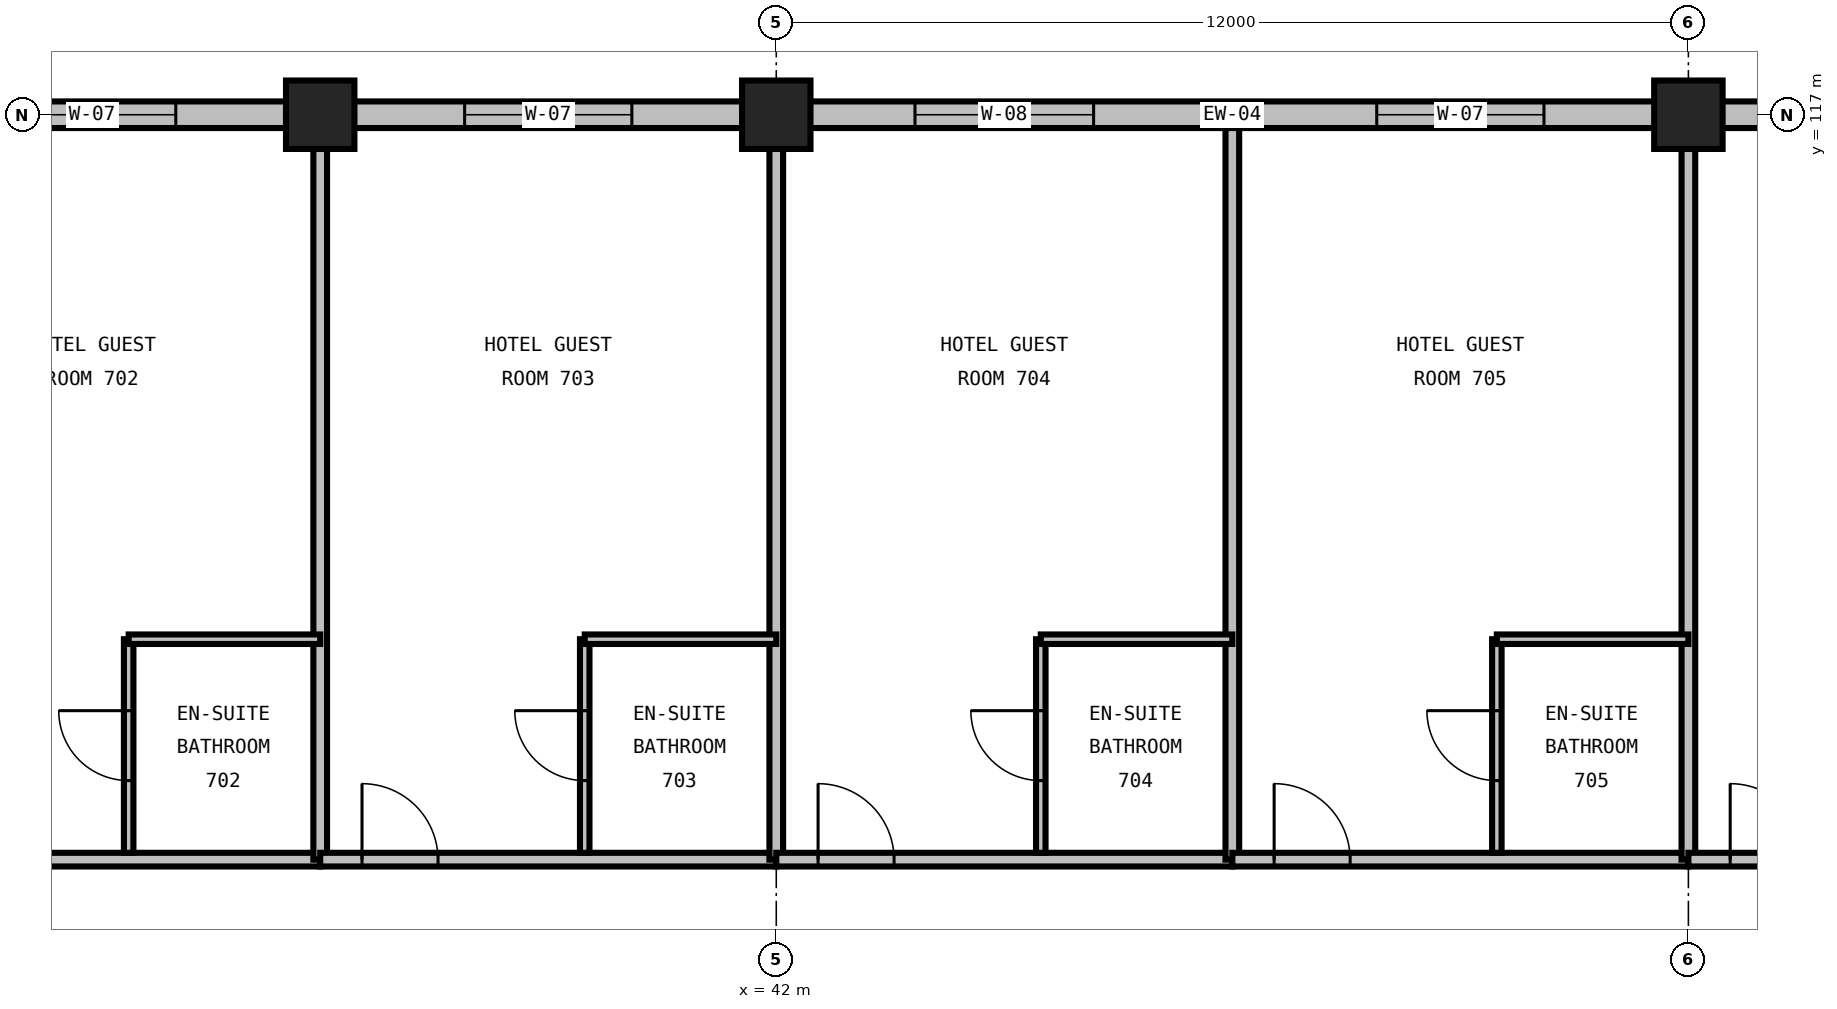
"""IFC4 building model, lengths in metres.
Left out: names, types, materials, properties, quantities, classifications, styles, units other than length and angle.
Written with IfcOpenShell. Run it as: python <this file> out.ifc"""

import sys

from ifc_helpers import new_model, si_unit, direction, frame, frame_2d, origin, origin_2d, place, context, subcontext, project, spatial, rectangle, extrude, element, fill, save


model = new_model("IFC4")
c1 = context("Model", 3, precision=1e-05, world=origin(), true_north=direction((0.0, 1.0)))
c2 = subcontext(c1, "Body", "Model", "MODEL_VIEW")
j1 = project(units=[si_unit("LENGTHUNIT", "METRE"), si_unit("PLANEANGLEUNIT", "RADIAN")], contexts=[c1])
p1 = place(None, origin())
s1 = spatial("IfcSite", under=j1, at=p1, CompositionType="ELEMENT")
p2 = place(p1, origin())
s2 = spatial("IfcBuilding", under=s1, at=p2, CompositionType="ELEMENT")
p3 = place(p2, frame((0.0, 0.0, 34.8)))
s3 = spatial("IfcBuildingStorey", under=s2, at=p3, CompositionType="ELEMENT", Elevation=34.8)
for number, where, z_axis, x_axis in (
    (1, (36.0, 117.0, 0.0), (0.0, 0.0, 1.0), (1.0, 0.0, 0.0)),
    (2, (42.0, 117.0, 0.0), (0.0, 0.0, 1.0), (1.0, 0.0, 0.0)),
    (3, (54.0, 117.0, 0.0), (0.0, 0.0, 1.0), (1.0, 0.0, 0.0)),
):
    element("IfcColumn", number, at=place(p3, frame(where, z_axis=z_axis, x_axis=x_axis)), inside=s3, PredefinedType="COLUMN", context=c2, shape_type="SweptSolid", body=[
        extrude(rectangle(XDim=0.9, YDim=0.9, at=origin_2d()), origin(), (0.0, 0.0, 1.0), 3.6),
    ])
p4 = place(p3, frame((36.0, 117.0, 0.0), z_axis=(0.0, 0.0, 1.0), x_axis=(-1.0, 0.0, 0.0)))
e4 = element("IfcWall", 4, at=p4, inside=s3, PredefinedType="STANDARD", context=c2, shape_type="SweptSolid", body=[
    extrude(rectangle(XDim=6.0, YDim=0.35, at=frame_2d((3.0, 0.0))), origin(), (0.0, 0.0, 1.0), 2.486),
])
p5 = place(p4, frame((1.9, 0.0, 0.75)))
e5 = element("IfcOpeningElement", 5, at=p5, cuts=e4, PredefinedType="OPENING", context=c2, shape_type="SweptSolid", body=[
    extrude(rectangle(XDim=2.2, YDim=1.6, at=frame_2d((1.1, 0.8))), frame((0.0, 0.19, 0.0), z_axis=(0.0, -1.0, 0.0), x_axis=(1.0, 0.0, 0.0)), (0.0, 0.0, 1.0), 0.38),
])
p6 = place(p3, frame((42.0, 117.0, 0.0), z_axis=(0.0, 0.0, 1.0), x_axis=(-1.0, 0.0, 0.0)))
e6 = element("IfcWall", 6, at=p6, inside=s3, PredefinedType="STANDARD", context=c2, shape_type="SweptSolid", body=[
    extrude(rectangle(XDim=6.0, YDim=0.35, at=frame_2d((3.0, 0.0))), origin(), (0.0, 0.0, 1.0), 2.486),
])
p7 = place(p6, frame((1.9, 0.0, 0.75)))
e7 = element("IfcOpeningElement", 7, at=p7, cuts=e6, PredefinedType="OPENING", context=c2, shape_type="SweptSolid", body=[
    extrude(rectangle(XDim=2.2, YDim=1.6, at=frame_2d((1.1, 0.8))), frame((0.0, 0.19, 0.0), z_axis=(0.0, -1.0, 0.0), x_axis=(1.0, 0.0, 0.0)), (0.0, 0.0, 1.0), 0.38),
])
p8 = place(p3, frame((54.0, 117.0, 0.0), z_axis=(0.0, 0.0, 1.0), x_axis=(-1.0, 0.0, 0.0)))
e8 = element("IfcWall", 8, at=p8, inside=s3, PredefinedType="STANDARD", context=c2, shape_type="SweptSolid", body=[
    extrude(rectangle(XDim=12.0, YDim=0.35, at=frame_2d((6.0, 0.0))), origin(), (0.0, 0.0, 1.0), 2.486),
])
p9 = place(p8, frame((1.9, 0.0, 0.75)))
e9 = element("IfcOpeningElement", 9, at=p9, cuts=e8, PredefinedType="OPENING", context=c2, shape_type="SweptSolid", body=[
    extrude(rectangle(XDim=2.2, YDim=1.6, at=frame_2d((1.1, 0.8))), frame((0.0, 0.19, 0.0), z_axis=(0.0, -1.0, 0.0), x_axis=(1.0, 0.0, 0.0)), (0.0, 0.0, 1.0), 0.38),
])
p10 = place(p8, frame((7.825, 0.0, 0.75)))
e10 = element("IfcOpeningElement", 10, at=p10, cuts=e8, PredefinedType="OPENING", context=c2, shape_type="SweptSolid", body=[
    extrude(rectangle(XDim=2.35, YDim=1.6, at=frame_2d((1.175, 0.8))), frame((0.0, 0.19, 0.0), z_axis=(0.0, -1.0, 0.0), x_axis=(1.0, 0.0, 0.0)), (0.0, 0.0, 1.0), 0.38),
])
p11 = place(p3, frame((66.0, 117.0, 0.0), z_axis=(0.0, 0.0, 1.0), x_axis=(-1.0, 0.0, 0.0)))
e11 = element("IfcWall", 11, at=p11, inside=s3, PredefinedType="STANDARD", context=c2, shape_type="SweptSolid", body=[
    extrude(rectangle(XDim=12.0, YDim=0.35, at=frame_2d((6.0, 0.0))), origin(), (0.0, 0.0, 1.0), 2.486),
])
p12 = place(p11, frame((1.9, 0.0, 0.75)))
e12 = element("IfcOpeningElement", 12, at=p12, cuts=e11, PredefinedType="OPENING", context=c2, shape_type="SweptSolid", body=[
    extrude(rectangle(XDim=2.2, YDim=1.6, at=frame_2d((1.1, 0.8))), frame((0.0, 0.19, 0.0), z_axis=(0.0, -1.0, 0.0), x_axis=(1.0, 0.0, 0.0)), (0.0, 0.0, 1.0), 0.38),
])
p13 = place(p11, frame((7.825, 0.0, 0.75)))
e13 = element("IfcOpeningElement", 13, at=p13, cuts=e11, PredefinedType="OPENING", context=c2, shape_type="SweptSolid", body=[
    extrude(rectangle(XDim=2.35, YDim=1.6, at=frame_2d((1.175, 0.8))), frame((0.0, 0.19, 0.0), z_axis=(0.0, -1.0, 0.0), x_axis=(1.0, 0.0, 0.0)), (0.0, 0.0, 1.0), 0.38),
])
p14 = place(p3, frame((30.0, 107.2, 0.0), z_axis=(0.0, 0.0, 1.0), x_axis=(1.0, 0.0, 0.0)))
e14 = element("IfcWall", 14, at=p14, inside=s3, PredefinedType="PARTITIONING", context=c2, shape_type="SweptSolid", body=[
    extrude(rectangle(XDim=6.0, YDim=0.18, at=frame_2d((3.0, 0.0))), origin(), (0.0, 0.0, 1.0), 3.29),
])
p15 = place(p14, frame((0.55, 0.0, 0.0)))
e15 = element("IfcOpeningElement", 15, at=p15, cuts=e14, PredefinedType="OPENING", context=c2, shape_type="SweptSolid", body=[
    extrude(rectangle(XDim=1.0, YDim=2.15, at=frame_2d((0.5, 1.075))), frame((0.0, 0.105, 0.0), z_axis=(0.0, -1.0, 0.0), x_axis=(1.0, 0.0, 0.0)), (0.0, 0.0, 1.0), 0.21),
])
p16 = place(p3, frame((36.0, 107.2, 0.0), z_axis=(0.0, 0.0, 1.0), x_axis=(0.0, 1.0, 0.0)))
e16 = element("IfcWall", 16, at=p16, inside=s3, PredefinedType="PARTITIONING", context=c2, shape_type="SweptSolid", body=[
    extrude(rectangle(XDim=9.625, YDim=0.18, at=frame_2d((4.812, 0.0))), origin(), (0.0, 0.0, 1.0), 2.59),
])
p17 = place(p3, frame((33.48, 107.29, 0.0), z_axis=(0.0, 0.0, 1.0), x_axis=(0.0, 1.0, 0.0)))
e17 = element("IfcWall", 17, at=p17, inside=s3, PredefinedType="PARTITIONING", context=c2, shape_type="SweptSolid", body=[
    extrude(rectangle(XDim=2.81, YDim=0.125, at=frame_2d((1.405, 0.0))), origin(), (0.0, 0.0, 1.0), 3.29),
])
p18 = place(p17, frame((0.95, 0.0, 0.0)))
e18 = element("IfcOpeningElement", 18, at=p18, cuts=e17, PredefinedType="OPENING", context=c2, shape_type="SweptSolid", body=[
    extrude(rectangle(XDim=0.92, YDim=2.1, at=frame_2d((0.46, 1.05))), frame((0.0, 0.077, 0.0), z_axis=(0.0, -1.0, 0.0), x_axis=(1.0, 0.0, 0.0)), (0.0, 0.0, 1.0), 0.155),
])
p19 = place(p3, frame((33.48, 110.1, 0.0), z_axis=(0.0, 0.0, 1.0), x_axis=(1.0, 0.0, 0.0)))
e19 = element("IfcWall", 19, at=p19, inside=s3, PredefinedType="PARTITIONING", context=c2, shape_type="SweptSolid", body=[
    extrude(rectangle(XDim=2.52, YDim=0.125, at=frame_2d((1.26, 0.0))), origin(), (0.0, 0.0, 1.0), 3.29),
])
p20 = place(p3, frame((36.0, 107.2, 0.0), z_axis=(0.0, 0.0, 1.0), x_axis=(1.0, 0.0, 0.0)))
e20 = element("IfcWall", 20, at=p20, inside=s3, PredefinedType="PARTITIONING", context=c2, shape_type="SweptSolid", body=[
    extrude(rectangle(XDim=6.0, YDim=0.18, at=frame_2d((3.0, 0.0))), origin(), (0.0, 0.0, 1.0), 3.29),
])
p21 = place(p20, frame((0.55, 0.0, 0.0)))
e21 = element("IfcOpeningElement", 21, at=p21, cuts=e20, PredefinedType="OPENING", context=c2, shape_type="SweptSolid", body=[
    extrude(rectangle(XDim=1.0, YDim=2.15, at=frame_2d((0.5, 1.075))), frame((0.0, 0.105, 0.0), z_axis=(0.0, -1.0, 0.0), x_axis=(1.0, 0.0, 0.0)), (0.0, 0.0, 1.0), 0.21),
])
p22 = place(p3, frame((42.0, 107.2, 0.0), z_axis=(0.0, 0.0, 1.0), x_axis=(0.0, 1.0, 0.0)))
e22 = element("IfcWall", 22, at=p22, inside=s3, PredefinedType="PARTITIONING", context=c2, shape_type="SweptSolid", body=[
    extrude(rectangle(XDim=9.625, YDim=0.18, at=frame_2d((4.812, 0.0))), origin(), (0.0, 0.0, 1.0), 2.59),
])
p23 = place(p3, frame((39.48, 107.29, 0.0), z_axis=(0.0, 0.0, 1.0), x_axis=(0.0, 1.0, 0.0)))
e23 = element("IfcWall", 23, at=p23, inside=s3, PredefinedType="PARTITIONING", context=c2, shape_type="SweptSolid", body=[
    extrude(rectangle(XDim=2.81, YDim=0.125, at=frame_2d((1.405, 0.0))), origin(), (0.0, 0.0, 1.0), 3.29),
])
p24 = place(p23, frame((0.95, 0.0, 0.0)))
e24 = element("IfcOpeningElement", 24, at=p24, cuts=e23, PredefinedType="OPENING", context=c2, shape_type="SweptSolid", body=[
    extrude(rectangle(XDim=0.92, YDim=2.1, at=frame_2d((0.46, 1.05))), frame((0.0, 0.077, 0.0), z_axis=(0.0, -1.0, 0.0), x_axis=(1.0, 0.0, 0.0)), (0.0, 0.0, 1.0), 0.155),
])
p25 = place(p3, frame((39.48, 110.1, 0.0), z_axis=(0.0, 0.0, 1.0), x_axis=(1.0, 0.0, 0.0)))
e25 = element("IfcWall", 25, at=p25, inside=s3, PredefinedType="PARTITIONING", context=c2, shape_type="SweptSolid", body=[
    extrude(rectangle(XDim=2.52, YDim=0.125, at=frame_2d((1.26, 0.0))), origin(), (0.0, 0.0, 1.0), 3.29),
])
p26 = place(p3, frame((42.0, 107.2, 0.0), z_axis=(0.0, 0.0, 1.0), x_axis=(1.0, 0.0, 0.0)))
e26 = element("IfcWall", 26, at=p26, inside=s3, PredefinedType="PARTITIONING", context=c2, shape_type="SweptSolid", body=[
    extrude(rectangle(XDim=6.0, YDim=0.18, at=frame_2d((3.0, 0.0))), origin(), (0.0, 0.0, 1.0), 3.29),
])
p27 = place(p26, frame((0.55, 0.0, 0.0)))
e27 = element("IfcOpeningElement", 27, at=p27, cuts=e26, PredefinedType="OPENING", context=c2, shape_type="SweptSolid", body=[
    extrude(rectangle(XDim=1.0, YDim=2.15, at=frame_2d((0.5, 1.075))), frame((0.0, 0.105, 0.0), z_axis=(0.0, -1.0, 0.0), x_axis=(1.0, 0.0, 0.0)), (0.0, 0.0, 1.0), 0.21),
])
p28 = place(p3, frame((48.0, 107.2, 0.0), z_axis=(0.0, 0.0, 1.0), x_axis=(0.0, 1.0, 0.0)))
e28 = element("IfcWall", 28, at=p28, inside=s3, PredefinedType="PARTITIONING", context=c2, shape_type="SweptSolid", body=[
    extrude(rectangle(XDim=9.625, YDim=0.18, at=frame_2d((4.812, 0.0))), origin(), (0.0, 0.0, 1.0), 3.29),
])
p29 = place(p3, frame((45.48, 107.29, 0.0), z_axis=(0.0, 0.0, 1.0), x_axis=(0.0, 1.0, 0.0)))
e29 = element("IfcWall", 29, at=p29, inside=s3, PredefinedType="PARTITIONING", context=c2, shape_type="SweptSolid", body=[
    extrude(rectangle(XDim=2.81, YDim=0.125, at=frame_2d((1.405, 0.0))), origin(), (0.0, 0.0, 1.0), 3.29),
])
p30 = place(p29, frame((0.95, 0.0, 0.0)))
e30 = element("IfcOpeningElement", 30, at=p30, cuts=e29, PredefinedType="OPENING", context=c2, shape_type="SweptSolid", body=[
    extrude(rectangle(XDim=0.92, YDim=2.1, at=frame_2d((0.46, 1.05))), frame((0.0, 0.077, 0.0), z_axis=(0.0, -1.0, 0.0), x_axis=(1.0, 0.0, 0.0)), (0.0, 0.0, 1.0), 0.155),
])
p31 = place(p3, frame((45.48, 110.1, 0.0), z_axis=(0.0, 0.0, 1.0), x_axis=(1.0, 0.0, 0.0)))
e31 = element("IfcWall", 31, at=p31, inside=s3, PredefinedType="PARTITIONING", context=c2, shape_type="SweptSolid", body=[
    extrude(rectangle(XDim=2.52, YDim=0.125, at=frame_2d((1.26, 0.0))), origin(), (0.0, 0.0, 1.0), 3.29),
])
p32 = place(p3, frame((48.0, 107.2, 0.0), z_axis=(0.0, 0.0, 1.0), x_axis=(1.0, 0.0, 0.0)))
e32 = element("IfcWall", 32, at=p32, inside=s3, PredefinedType="PARTITIONING", context=c2, shape_type="SweptSolid", body=[
    extrude(rectangle(XDim=6.0, YDim=0.18, at=frame_2d((3.0, 0.0))), origin(), (0.0, 0.0, 1.0), 3.29),
])
p33 = place(p32, frame((0.55, 0.0, 0.0)))
e33 = element("IfcOpeningElement", 33, at=p33, cuts=e32, PredefinedType="OPENING", context=c2, shape_type="SweptSolid", body=[
    extrude(rectangle(XDim=1.0, YDim=2.15, at=frame_2d((0.5, 1.075))), frame((0.0, 0.105, 0.0), z_axis=(0.0, -1.0, 0.0), x_axis=(1.0, 0.0, 0.0)), (0.0, 0.0, 1.0), 0.21),
])
p34 = place(p3, frame((54.0, 107.2, 0.0), z_axis=(0.0, 0.0, 1.0), x_axis=(0.0, 1.0, 0.0)))
e34 = element("IfcWall", 34, at=p34, inside=s3, PredefinedType="PARTITIONING", context=c2, shape_type="SweptSolid", body=[
    extrude(rectangle(XDim=9.625, YDim=0.18, at=frame_2d((4.812, 0.0))), origin(), (0.0, 0.0, 1.0), 2.59),
])
p35 = place(p3, frame((51.48, 107.29, 0.0), z_axis=(0.0, 0.0, 1.0), x_axis=(0.0, 1.0, 0.0)))
e35 = element("IfcWall", 35, at=p35, inside=s3, PredefinedType="PARTITIONING", context=c2, shape_type="SweptSolid", body=[
    extrude(rectangle(XDim=2.81, YDim=0.125, at=frame_2d((1.405, 0.0))), origin(), (0.0, 0.0, 1.0), 3.29),
])
p36 = place(p35, frame((0.95, 0.0, 0.0)))
e36 = element("IfcOpeningElement", 36, at=p36, cuts=e35, PredefinedType="OPENING", context=c2, shape_type="SweptSolid", body=[
    extrude(rectangle(XDim=0.92, YDim=2.1, at=frame_2d((0.46, 1.05))), frame((0.0, 0.077, 0.0), z_axis=(0.0, -1.0, 0.0), x_axis=(1.0, 0.0, 0.0)), (0.0, 0.0, 1.0), 0.155),
])
p37 = place(p3, frame((51.48, 110.1, 0.0), z_axis=(0.0, 0.0, 1.0), x_axis=(1.0, 0.0, 0.0)))
e37 = element("IfcWall", 37, at=p37, inside=s3, PredefinedType="PARTITIONING", context=c2, shape_type="SweptSolid", body=[
    extrude(rectangle(XDim=2.52, YDim=0.125, at=frame_2d((1.26, 0.0))), origin(), (0.0, 0.0, 1.0), 3.29),
])
p38 = place(p3, frame((54.0, 107.2, 0.0), z_axis=(0.0, 0.0, 1.0), x_axis=(1.0, 0.0, 0.0)))
e38 = element("IfcWall", 38, at=p38, inside=s3, PredefinedType="PARTITIONING", context=c2, shape_type="SweptSolid", body=[
    extrude(rectangle(XDim=6.0, YDim=0.18, at=frame_2d((3.0, 0.0))), origin(), (0.0, 0.0, 1.0), 3.29),
])
p39 = place(p38, frame((0.55, 0.0, 0.0)))
e39 = element("IfcOpeningElement", 39, at=p39, cuts=e38, PredefinedType="OPENING", context=c2, shape_type="SweptSolid", body=[
    extrude(rectangle(XDim=1.0, YDim=2.15, at=frame_2d((0.5, 1.075))), frame((0.0, 0.105, 0.0), z_axis=(0.0, -1.0, 0.0), x_axis=(1.0, 0.0, 0.0)), (0.0, 0.0, 1.0), 0.21),
])
p40 = place(p5, origin())
e40 = element("IfcWindow", 40, at=p40, inside=s3, PartitioningType="DOUBLE_PANEL_VERTICAL", PredefinedType="WINDOW", context=c2, shape_type="SweptSolid", body=[
    extrude(rectangle(XDim=2.2, YDim=1.6, at=frame_2d((1.1, 0.8))), frame((0.0, 0.03, 0.0), z_axis=(0.0, -1.0, 0.0), x_axis=(1.0, 0.0, 0.0)), (0.0, 0.0, 1.0), 0.06),
])
fill(e5, e40)
p41 = place(p7, origin())
e41 = element("IfcWindow", 41, at=p41, inside=s3, PartitioningType="DOUBLE_PANEL_VERTICAL", PredefinedType="WINDOW", context=c2, shape_type="SweptSolid", body=[
    extrude(rectangle(XDim=2.2, YDim=1.6, at=frame_2d((1.1, 0.8))), frame((0.0, 0.03, 0.0), z_axis=(0.0, -1.0, 0.0), x_axis=(1.0, 0.0, 0.0)), (0.0, 0.0, 1.0), 0.06),
])
fill(e7, e41)
p42 = place(p9, origin())
e42 = element("IfcWindow", 42, at=p42, inside=s3, PartitioningType="DOUBLE_PANEL_VERTICAL", PredefinedType="WINDOW", context=c2, shape_type="SweptSolid", body=[
    extrude(rectangle(XDim=2.2, YDim=1.6, at=frame_2d((1.1, 0.8))), frame((0.0, 0.03, 0.0), z_axis=(0.0, -1.0, 0.0), x_axis=(1.0, 0.0, 0.0)), (0.0, 0.0, 1.0), 0.06),
])
fill(e9, e42)
p43 = place(p10, origin())
e43 = element("IfcWindow", 43, at=p43, inside=s3, PartitioningType="DOUBLE_PANEL_VERTICAL", PredefinedType="WINDOW", context=c2, shape_type="SweptSolid", body=[
    extrude(rectangle(XDim=2.35, YDim=1.6, at=frame_2d((1.175, 0.8))), frame((0.0, 0.03, 0.0), z_axis=(0.0, -1.0, 0.0), x_axis=(1.0, 0.0, 0.0)), (0.0, 0.0, 1.0), 0.06),
])
fill(e10, e43)
p44 = place(p18, origin())
e44 = element("IfcDoor", 44, at=p44, inside=s3, OperationType="SINGLE_SWING_RIGHT", PredefinedType="DOOR", context=c2, shape_type="SweptSolid", body=[
    extrude(rectangle(XDim=0.92, YDim=2.1, at=frame_2d((0.46, 1.05))), frame((0.0, 0.025, 0.0), z_axis=(0.0, -1.0, 0.0), x_axis=(1.0, 0.0, 0.0)), (0.0, 0.0, 1.0), 0.05),
])
fill(e18, e44)
p45 = place(p21, origin())
e45 = element("IfcDoor", 45, at=p45, inside=s3, OperationType="SINGLE_SWING_LEFT", PredefinedType="DOOR", context=c2, shape_type="SweptSolid", body=[
    extrude(rectangle(XDim=1.0, YDim=2.15, at=frame_2d((0.5, 1.075))), frame((0.0, 0.025, 0.0), z_axis=(0.0, -1.0, 0.0), x_axis=(1.0, 0.0, 0.0)), (0.0, 0.0, 1.0), 0.05),
])
fill(e21, e45)
p46 = place(p24, origin())
e46 = element("IfcDoor", 46, at=p46, inside=s3, OperationType="SINGLE_SWING_RIGHT", PredefinedType="DOOR", context=c2, shape_type="SweptSolid", body=[
    extrude(rectangle(XDim=0.92, YDim=2.1, at=frame_2d((0.46, 1.05))), frame((0.0, 0.025, 0.0), z_axis=(0.0, -1.0, 0.0), x_axis=(1.0, 0.0, 0.0)), (0.0, 0.0, 1.0), 0.05),
])
fill(e24, e46)
p47 = place(p27, origin())
e47 = element("IfcDoor", 47, at=p47, inside=s3, OperationType="SINGLE_SWING_LEFT", PredefinedType="DOOR", context=c2, shape_type="SweptSolid", body=[
    extrude(rectangle(XDim=1.0, YDim=2.15, at=frame_2d((0.5, 1.075))), frame((0.0, 0.025, 0.0), z_axis=(0.0, -1.0, 0.0), x_axis=(1.0, 0.0, 0.0)), (0.0, 0.0, 1.0), 0.05),
])
fill(e27, e47)
p48 = place(p30, origin())
e48 = element("IfcDoor", 48, at=p48, inside=s3, OperationType="SINGLE_SWING_RIGHT", PredefinedType="DOOR", context=c2, shape_type="SweptSolid", body=[
    extrude(rectangle(XDim=0.92, YDim=2.1, at=frame_2d((0.46, 1.05))), frame((0.0, 0.025, 0.0), z_axis=(0.0, -1.0, 0.0), x_axis=(1.0, 0.0, 0.0)), (0.0, 0.0, 1.0), 0.05),
])
fill(e30, e48)
p49 = place(p33, origin())
e49 = element("IfcDoor", 49, at=p49, inside=s3, OperationType="SINGLE_SWING_LEFT", PredefinedType="DOOR", context=c2, shape_type="SweptSolid", body=[
    extrude(rectangle(XDim=1.0, YDim=2.15, at=frame_2d((0.5, 1.075))), frame((0.0, 0.025, 0.0), z_axis=(0.0, -1.0, 0.0), x_axis=(1.0, 0.0, 0.0)), (0.0, 0.0, 1.0), 0.05),
])
fill(e33, e49)
p50 = place(p36, origin())
e50 = element("IfcDoor", 50, at=p50, inside=s3, OperationType="SINGLE_SWING_RIGHT", PredefinedType="DOOR", context=c2, shape_type="SweptSolid", body=[
    extrude(rectangle(XDim=0.92, YDim=2.1, at=frame_2d((0.46, 1.05))), frame((0.0, 0.025, 0.0), z_axis=(0.0, -1.0, 0.0), x_axis=(1.0, 0.0, 0.0)), (0.0, 0.0, 1.0), 0.05),
])
fill(e36, e50)
p51 = place(p39, origin())
e51 = element("IfcDoor", 51, at=p51, inside=s3, OperationType="SINGLE_SWING_LEFT", PredefinedType="DOOR", context=c2, shape_type="SweptSolid", body=[
    extrude(rectangle(XDim=1.0, YDim=2.15, at=frame_2d((0.5, 1.075))), frame((0.0, 0.025, 0.0), z_axis=(0.0, -1.0, 0.0), x_axis=(1.0, 0.0, 0.0)), (0.0, 0.0, 1.0), 0.05),
])
fill(e39, e51)
save(model, sys.argv[1])
